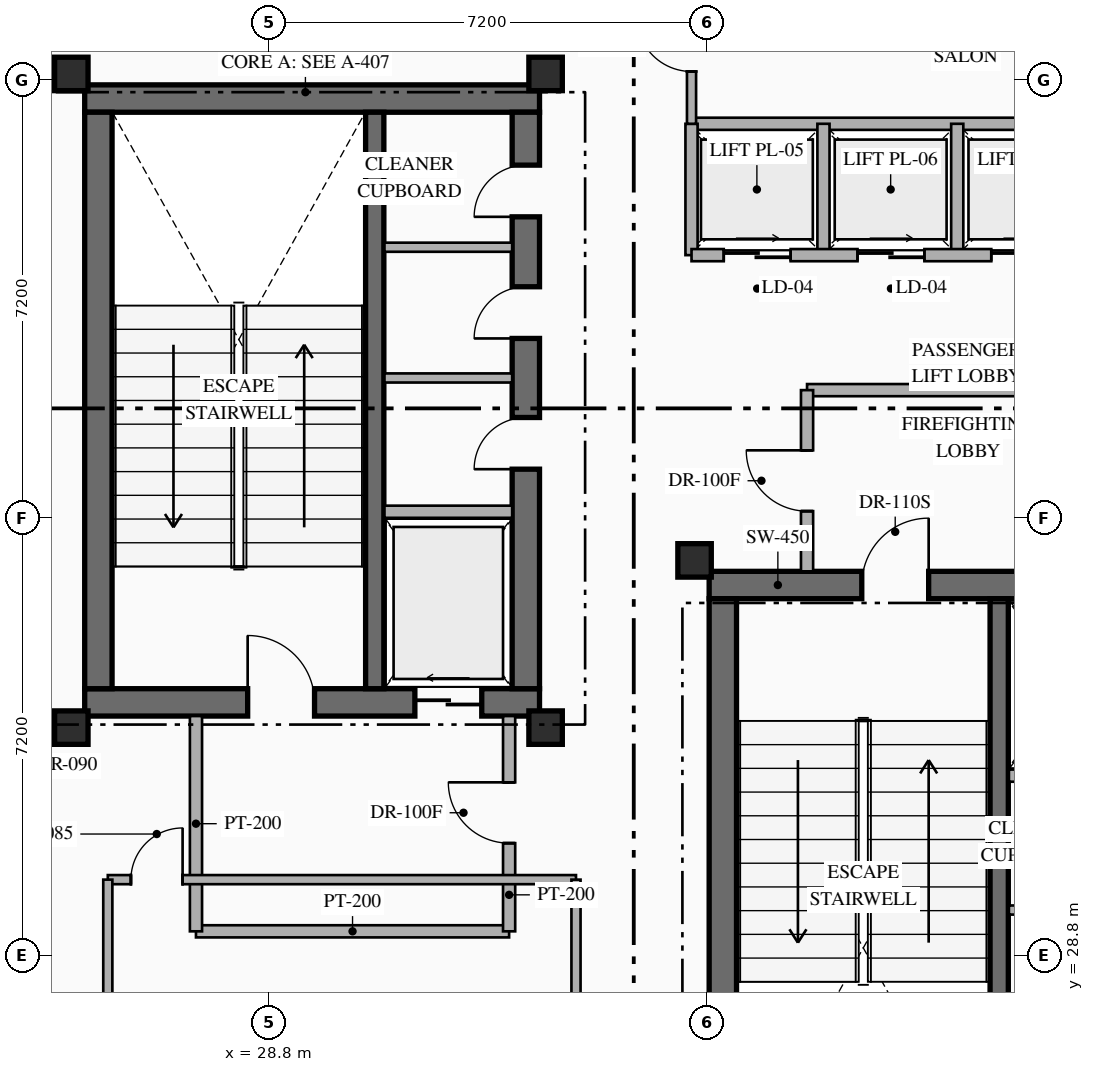
"""IFC4 building model, lengths in metres.
Left out: names, types, materials, properties, quantities, classifications, styles, units other than length and angle.
Written with IfcOpenShell. Run it as: python <this file> out.ifc"""

import sys

from ifc_helpers import new_model, si_unit, direction, frame, frame_2d, origin, origin_2d, place, context, subcontext, project, spatial, rectangle, hollow_rectangle, extrude, element, fill, save


model = new_model("IFC4")
c1 = context("Model", 3, precision=1e-05, world=origin(), true_north=direction((0.0, 1.0)))
c2 = subcontext(c1, "Body", "Model", "MODEL_VIEW")
j1 = project(units=[si_unit("LENGTHUNIT", "METRE"), si_unit("PLANEANGLEUNIT", "RADIAN")], contexts=[c1])
p1 = place(None, origin())
s1 = spatial("IfcSite", under=j1, at=p1, CompositionType="ELEMENT")
p2 = place(p1, origin())
s2 = spatial("IfcBuilding", under=s1, at=p2, CompositionType="ELEMENT")
p3 = place(p2, frame((0.0, 0.0, 285.95)))
s3 = spatial("IfcBuildingStorey", under=s2, at=p3, CompositionType="ELEMENT", Elevation=285.95)
p4 = place(p3, frame((25.77, 32.965, 0.0), z_axis=(0.0, 0.0, 1.0), x_axis=(1.0, 0.0, 0.0)))
e1 = element("IfcWall", 1, at=p4, inside=s3, PredefinedType="SHEAR", context=c2, shape_type="SweptSolid", body=[
    extrude(rectangle(XDim=7.48, YDim=0.45, at=frame_2d((3.74, 0.0))), origin(), (0.0, 0.0, 1.0), 4.0),
])
p5 = place(p4, frame((2.68, 0.0, 0.0)))
e2 = element("IfcOpeningElement", 2, at=p5, cuts=e1, PredefinedType="OPENING", context=c2, shape_type="SweptSolid", body=[
    extrude(rectangle(XDim=1.1, YDim=2.2, at=frame_2d((0.55, 1.1))), frame((0.0, 0.235, 0.0), z_axis=(0.0, -1.0, 0.0), x_axis=(1.0, 0.0, 0.0)), (0.0, 0.0, 1.0), 0.47),
])
p6 = place(p4, frame((5.43, 0.0, 0.0)))
e3 = element("IfcOpeningElement", 3, at=p6, cuts=e1, PredefinedType="OPENING", context=c2, shape_type="SweptSolid", body=[
    extrude(rectangle(XDim=1.1, YDim=2.15, at=frame_2d((0.55, 1.075))), frame((0.0, 0.235, 0.0), z_axis=(0.0, -1.0, 0.0), x_axis=(1.0, 0.0, 0.0)), (0.0, 0.0, 1.0), 0.47),
])
p7 = place(p3, frame((25.77, 42.895, 0.0), z_axis=(0.0, 0.0, 1.0), x_axis=(1.0, 0.0, 0.0)))
e4 = element("IfcWall", 4, at=p7, inside=s3, PredefinedType="SHEAR", context=c2, shape_type="SweptSolid", body=[
    extrude(rectangle(XDim=7.48, YDim=0.45, at=frame_2d((3.74, 0.0))), origin(), (0.0, 0.0, 1.0), 4.0),
])
p8 = place(p3, frame((25.995, 33.19, 0.0), z_axis=(0.0, 0.0, 1.0), x_axis=(0.0, 1.0, 0.0)))
e5 = element("IfcWall", 5, at=p8, inside=s3, PredefinedType="SHEAR", context=c2, shape_type="SweptSolid", body=[
    extrude(rectangle(XDim=9.48, YDim=0.45, at=frame_2d((4.74, 0.0))), origin(), (0.0, 0.0, 1.0), 4.0),
])
p9 = place(p3, frame((33.025, 33.19, 0.0), z_axis=(0.0, 0.0, 1.0), x_axis=(0.0, 1.0, 0.0)))
e6 = element("IfcWall", 6, at=p9, inside=s3, PredefinedType="SHEAR", context=c2, shape_type="SweptSolid", body=[
    extrude(rectangle(XDim=9.48, YDim=0.45, at=frame_2d((4.74, 0.0))), origin(), (0.0, 0.0, 1.0), 4.0),
])
p10 = place(p9, frame((3.61, 0.0, 0.0)))
e7 = element("IfcOpeningElement", 7, at=p10, cuts=e6, PredefinedType="OPENING", context=c2, shape_type="SweptSolid", body=[
    extrude(rectangle(XDim=0.85, YDim=2.08, at=frame_2d((0.425, 1.04))), frame((0.0, 0.235, 0.0), z_axis=(0.0, -1.0, 0.0), x_axis=(1.0, 0.0, 0.0)), (0.0, 0.0, 1.0), 0.47),
])
p11 = place(p9, frame((5.76, 0.0, 0.0)))
e8 = element("IfcOpeningElement", 8, at=p11, cuts=e6, PredefinedType="OPENING", context=c2, shape_type="SweptSolid", body=[
    extrude(rectangle(XDim=0.85, YDim=2.08, at=frame_2d((0.425, 1.04))), frame((0.0, 0.235, 0.0), z_axis=(0.0, -1.0, 0.0), x_axis=(1.0, 0.0, 0.0)), (0.0, 0.0, 1.0), 0.47),
])
p12 = place(p9, frame((7.76, 0.0, 0.0)))
e9 = element("IfcOpeningElement", 9, at=p12, cuts=e6, PredefinedType="OPENING", context=c2, shape_type="SweptSolid", body=[
    extrude(rectangle(XDim=0.85, YDim=2.08, at=frame_2d((0.425, 1.04))), frame((0.0, 0.235, 0.0), z_axis=(0.0, -1.0, 0.0), x_axis=(1.0, 0.0, 0.0)), (0.0, 0.0, 1.0), 0.47),
])
p13 = place(p3, frame((30.54, 33.19, 0.0), z_axis=(0.0, 0.0, 1.0), x_axis=(0.0, 1.0, 0.0)))
e10 = element("IfcWall", 10, at=p13, inside=s3, PredefinedType="SHEAR", context=c2, shape_type="SweptSolid", body=[
    extrude(rectangle(XDim=9.48, YDim=0.3, at=frame_2d((4.74, 0.0))), origin(), (0.0, 0.0, 1.0), 4.0),
])
p14 = place(p3, frame((36.04, 34.895, 0.0), z_axis=(0.0, 0.0, 1.0), x_axis=(1.0, 0.0, 0.0)))
e11 = element("IfcWall", 11, at=p14, inside=s3, PredefinedType="SHEAR", context=c2, shape_type="SweptSolid", body=[
    extrude(rectangle(XDim=7.46, YDim=0.45, at=frame_2d((3.73, 0.0))), origin(), (0.0, 0.0, 1.0), 4.0),
])
p15 = place(p14, frame((2.51, 0.0, 0.0)))
e12 = element("IfcOpeningElement", 12, at=p15, cuts=e11, PredefinedType="OPENING", context=c2, shape_type="SweptSolid", body=[
    extrude(rectangle(XDim=1.1, YDim=2.2, at=frame_2d((0.55, 1.1))), frame((0.0, 0.235, 0.0), z_axis=(0.0, -1.0, 0.0), x_axis=(1.0, 0.0, 0.0)), (0.0, 0.0, 1.0), 0.47),
])
p16 = place(p14, frame((5.41, 0.0, 0.0)))
e13 = element("IfcOpeningElement", 13, at=p16, cuts=e11, PredefinedType="OPENING", context=c2, shape_type="SweptSolid", body=[
    extrude(rectangle(XDim=1.12, YDim=2.15, at=frame_2d((0.56, 1.075))), frame((0.0, 0.235, 0.0), z_axis=(0.0, -1.0, 0.0), x_axis=(1.0, 0.0, 0.0)), (0.0, 0.0, 1.0), 0.47),
])
p17 = place(p3, frame((36.265, 25.19, 0.0), z_axis=(0.0, 0.0, 1.0), x_axis=(0.0, 1.0, 0.0)))
e14 = element("IfcWall", 14, at=p17, inside=s3, PredefinedType="SHEAR", context=c2, shape_type="SweptSolid", body=[
    extrude(rectangle(XDim=9.48, YDim=0.45, at=frame_2d((4.74, 0.0))), origin(), (0.0, 0.0, 1.0), 4.0),
])
p18 = place(p3, frame((40.81, 25.19, 0.0), z_axis=(0.0, 0.0, 1.0), x_axis=(0.0, 1.0, 0.0)))
e15 = element("IfcWall", 15, at=p18, inside=s3, PredefinedType="SHEAR", context=c2, shape_type="SweptSolid", body=[
    extrude(rectangle(XDim=9.48, YDim=0.3, at=frame_2d((4.74, 0.0))), origin(), (0.0, 0.0, 1.0), 4.0),
])
for number, where, z_axis, x_axis in (
    (16, (25.55, 32.55, 0.0), (0.0, 0.0, 1.0), (1.0, 0.0, 0.0)),
    (17, (33.35, 32.55, 0.0), (0.0, 0.0, 1.0), (1.0, 0.0, 0.0)),
    (18, (25.55, 43.3, 0.0), (0.0, 0.0, 1.0), (1.0, 0.0, 0.0)),
    (19, (33.35, 43.3, 0.0), (0.0, 0.0, 1.0), (1.0, 0.0, 0.0)),
    (20, (35.8, 35.3, 0.0), (0.0, 0.0, 1.0), (1.0, 0.0, 0.0)),
):
    element("IfcColumn", number, at=place(p3, frame(where, z_axis=z_axis, x_axis=x_axis)), inside=s3, PredefinedType="COLUMN", context=c2, shape_type="SweptSolid", body=[
        extrude(hollow_rectangle(XDim=0.55, YDim=0.55, WallThickness=0.022, at=origin_2d()), origin(), (0.0, 0.0, 1.0), 4.0),
    ])
p19 = place(p3, frame((30.7, 36.1, 0.0), z_axis=(0.0, 0.0, 1.0), x_axis=(1.0, 0.0, 0.0)))
e21 = element("IfcWall", 21, at=p19, inside=s3, PredefinedType="STANDARD", context=c2, shape_type="SweptSolid", body=[
    extrude(rectangle(XDim=2.1, YDim=0.2, at=frame_2d((1.05, 0.0))), origin(), (0.0, 0.0, 1.0), 3.7),
])
for number, where, z_axis, x_axis in (
    (22, (30.7, 38.3, 0.0), (0.0, 0.0, 1.0), (1.0, 0.0, 0.0)),
    (23, (30.7, 40.45, 0.0), (0.0, 0.0, 1.0), (1.0, 0.0, 0.0)),
):
    element("IfcWall", number, at=place(p3, frame(where, z_axis=z_axis, x_axis=x_axis)), inside=s3, PredefinedType="PARTITIONING", context=c2, shape_type="SweptSolid", body=[
        extrude(rectangle(XDim=2.1, YDim=0.15, at=frame_2d((1.05, 0.0))), origin(), (0.0, 0.0, 1.0), 3.7),
    ])
p20 = place(p3, frame((40.97, 31.76, 0.0), z_axis=(0.0, 0.0, 1.0), x_axis=(1.0, 0.0, 0.0)))
e24 = element("IfcWall", 24, at=p20, inside=s3, PredefinedType="STANDARD", context=c2, shape_type="SweptSolid", body=[
    extrude(rectangle(XDim=2.08, YDim=0.2, at=frame_2d((1.04, 0.0))), origin(), (0.0, 0.0, 1.0), 3.7),
])
p21 = place(p3, frame((40.97, 29.55, 0.0), z_axis=(0.0, 0.0, 1.0), x_axis=(1.0, 0.0, 0.0)))
e25 = element("IfcWall", 25, at=p21, inside=s3, PredefinedType="PARTITIONING", context=c2, shape_type="SweptSolid", body=[
    extrude(rectangle(XDim=2.08, YDim=0.15, at=frame_2d((1.04, 0.0))), origin(), (0.0, 0.0, 1.0), 3.7),
])
p22 = place(p3, frame((27.6, 29.2, 0.0), z_axis=(0.0, 0.0, 1.0), x_axis=(1.0, 0.0, 0.0)))
e26 = element("IfcWall", 26, at=p22, inside=s3, PredefinedType="STANDARD", context=c2, shape_type="SweptSolid", body=[
    extrude(rectangle(XDim=5.15, YDim=0.2, at=frame_2d((2.575, 0.0))), origin(), (0.0, 0.0, 1.0), 3.7),
])
p23 = place(p3, frame((27.6, 29.2, 0.0), z_axis=(0.0, 0.0, 1.0), x_axis=(0.0, 1.0, 0.0)))
e27 = element("IfcWall", 27, at=p23, inside=s3, PredefinedType="STANDARD", context=c2, shape_type="SweptSolid", body=[
    extrude(rectangle(XDim=3.54, YDim=0.2, at=frame_2d((1.77, 0.0))), origin(), (0.0, 0.0, 1.0), 3.7),
])
p24 = place(p3, frame((32.75, 29.2, 0.0), z_axis=(0.0, 0.0, 1.0), x_axis=(0.0, 1.0, 0.0)))
e28 = element("IfcWall", 28, at=p24, inside=s3, PredefinedType="STANDARD", context=c2, shape_type="SweptSolid", body=[
    extrude(rectangle(XDim=3.54, YDim=0.2, at=frame_2d((1.77, 0.0))), origin(), (0.0, 0.0, 1.0), 3.7),
])
p25 = place(p24, frame((1.45, 0.0, 0.0)))
e29 = element("IfcOpeningElement", 29, at=p25, cuts=e28, PredefinedType="OPENING", context=c2, shape_type="SweptSolid", body=[
    extrude(rectangle(XDim=1.0, YDim=2.2, at=frame_2d((0.5, 1.1))), frame((0.0, 0.11, 0.0), z_axis=(0.0, -1.0, 0.0), x_axis=(1.0, 0.0, 0.0)), (0.0, 0.0, 1.0), 0.22),
])
p26 = place(p3, frame((37.65, 38.1, 0.0), z_axis=(0.0, 0.0, 1.0), x_axis=(1.0, 0.0, 0.0)))
e30 = element("IfcWall", 30, at=p26, inside=s3, PredefinedType="STANDARD", context=c2, shape_type="SweptSolid", body=[
    extrude(rectangle(XDim=5.3, YDim=0.2, at=frame_2d((2.65, 0.0))), origin(), (0.0, 0.0, 1.0), 3.7),
])
p27 = place(p3, frame((37.65, 35.12, 0.0), z_axis=(0.0, 0.0, 1.0), x_axis=(0.0, 1.0, 0.0)))
e31 = element("IfcWall", 31, at=p27, inside=s3, PredefinedType="STANDARD", context=c2, shape_type="SweptSolid", body=[
    extrude(rectangle(XDim=2.98, YDim=0.2, at=frame_2d((1.49, 0.0))), origin(), (0.0, 0.0, 1.0), 3.7),
])
p28 = place(p27, frame((0.99, 0.0, 0.0)))
e32 = element("IfcOpeningElement", 32, at=p28, cuts=e31, PredefinedType="OPENING", context=c2, shape_type="SweptSolid", body=[
    extrude(rectangle(XDim=1.0, YDim=2.2, at=frame_2d((0.5, 1.1))), frame((0.0, 0.11, 0.0), z_axis=(0.0, -1.0, 0.0), x_axis=(1.0, 0.0, 0.0)), (0.0, 0.0, 1.0), 0.22),
])
p29 = place(p3, frame((35.75, 42.48, 0.0), z_axis=(0.0, 0.0, 1.0), x_axis=(1.0, 0.0, 0.0)))
e33 = element("IfcWall", 33, at=p29, inside=s3, PredefinedType="STANDARD", context=c2, shape_type="SweptSolid", body=[
    extrude(rectangle(XDim=9.11, YDim=0.2, at=frame_2d((4.555, 0.0))), origin(), (0.0, 0.0, 1.0), 3.7),
])
for number, where, z_axis, x_axis in (
    (34, (35.75, 40.32, 0.0), (0.0, 0.0, 1.0), (0.0, 1.0, 0.0)),
    (35, (37.92, 40.32, 0.0), (0.0, 0.0, 1.0), (0.0, 1.0, 0.0)),
    (36, (40.12, 40.32, 0.0), (0.0, 0.0, 1.0), (0.0, 1.0, 0.0)),
):
    element("IfcWall", number, at=place(p3, frame(where, z_axis=z_axis, x_axis=x_axis)), inside=s3, PredefinedType="STANDARD", context=c2, shape_type="SweptSolid", body=[
        extrude(rectangle(XDim=2.16, YDim=0.2, at=frame_2d((1.08, 0.0))), origin(), (0.0, 0.0, 1.0), 3.7),
    ])
p30 = place(p3, frame((35.75, 40.32, 0.0), z_axis=(0.0, 0.0, 1.0), x_axis=(1.0, 0.0, 0.0)))
e37 = element("IfcWall", 37, at=p30, inside=s3, PredefinedType="STANDARD", context=c2, shape_type="SweptSolid", body=[
    extrude(rectangle(XDim=9.11, YDim=0.2, at=frame_2d((4.555, 0.0))), origin(), (0.0, 0.0, 1.0), 3.7),
])
p31 = place(p30, frame((0.53, 0.0, 0.0)))
e38 = element("IfcOpeningElement", 38, at=p31, cuts=e37, PredefinedType="OPENING", context=c2, shape_type="SweptSolid", body=[
    extrude(rectangle(XDim=1.1, YDim=2.18, at=frame_2d((0.55, 1.09))), frame((0.0, 0.11, 0.0), z_axis=(0.0, -1.0, 0.0), x_axis=(1.0, 0.0, 0.0)), (0.0, 0.0, 1.0), 0.22),
])
p32 = place(p30, frame((2.73, 0.0, 0.0)))
e39 = element("IfcOpeningElement", 39, at=p32, cuts=e37, PredefinedType="OPENING", context=c2, shape_type="SweptSolid", body=[
    extrude(rectangle(XDim=1.1, YDim=2.18, at=frame_2d((0.55, 1.09))), frame((0.0, 0.11, 0.0), z_axis=(0.0, -1.0, 0.0), x_axis=(1.0, 0.0, 0.0)), (0.0, 0.0, 1.0), 0.22),
])
p33 = place(p30, frame((4.93, 0.0, 0.0)))
e40 = element("IfcOpeningElement", 40, at=p33, cuts=e37, PredefinedType="OPENING", context=c2, shape_type="SweptSolid", body=[
    extrude(rectangle(XDim=1.1, YDim=2.18, at=frame_2d((0.55, 1.09))), frame((0.0, 0.11, 0.0), z_axis=(0.0, -1.0, 0.0), x_axis=(1.0, 0.0, 0.0)), (0.0, 0.0, 1.0), 0.22),
])
p34 = place(p30, frame((7.13, 0.0, 0.0)))
e41 = element("IfcOpeningElement", 41, at=p34, cuts=e37, PredefinedType="OPENING", context=c2, shape_type="SweptSolid", body=[
    extrude(rectangle(XDim=1.1, YDim=2.18, at=frame_2d((0.55, 1.09))), frame((0.0, 0.11, 0.0), z_axis=(0.0, -1.0, 0.0), x_axis=(1.0, 0.0, 0.0)), (0.0, 0.0, 1.0), 0.22),
])
p35 = place(p3, frame((26.15, 30.05, 0.0), z_axis=(0.0, 0.0, 1.0), x_axis=(1.0, 0.0, 0.0)))
e42 = element("IfcWall", 42, at=p35, inside=s3, PredefinedType="PARTITIONING", context=c2, shape_type="SweptSolid", body=[
    extrude(rectangle(XDim=7.7, YDim=0.15, at=frame_2d((3.85, 0.0))), origin(), (0.0, 0.0, 1.0), 3.7),
])
p36 = place(p35, frame((0.38, 0.0, 0.0)))
e43 = element("IfcOpeningElement", 43, at=p36, cuts=e42, PredefinedType="OPENING", context=c2, shape_type="SweptSolid", body=[
    extrude(rectangle(XDim=0.85, YDim=2.08, at=frame_2d((0.425, 1.04))), frame((0.0, 0.085, 0.0), z_axis=(0.0, -1.0, 0.0), x_axis=(1.0, 0.0, 0.0)), (0.0, 0.0, 1.0), 0.17),
])
for number, where, z_axis, x_axis in (
    (44, (26.15, 23.4, 0.0), (0.0, 0.0, 1.0), (0.0, 1.0, 0.0)),
    (45, (33.85, 23.4, 0.0), (0.0, 0.0, 1.0), (0.0, 1.0, 0.0)),
):
    element("IfcWall", number, at=place(p3, frame(where, z_axis=z_axis, x_axis=x_axis)), inside=s3, PredefinedType="PARTITIONING", context=c2, shape_type="SweptSolid", body=[
        extrude(rectangle(XDim=6.65, YDim=0.15, at=frame_2d((3.325, 0.0))), origin(), (0.0, 0.0, 1.0), 3.7),
    ])
p37 = place(p3, frame((35.75, 42.48, 0.0), z_axis=(0.0, 0.0, 1.0), x_axis=(0.0, 1.0, 0.0)))
e46 = element("IfcWall", 46, at=p37, inside=s3, PredefinedType="PARTITIONING", context=c2, shape_type="SweptSolid", body=[
    extrude(rectangle(XDim=2.62, YDim=0.15, at=frame_2d((1.31, 0.0))), origin(), (0.0, 0.0, 1.0), 3.7),
])
p38 = place(p37, frame((0.86, 0.0, 0.0)))
e47 = element("IfcOpeningElement", 47, at=p38, cuts=e46, PredefinedType="OPENING", context=c2, shape_type="SweptSolid", body=[
    extrude(rectangle(XDim=0.9, YDim=2.15, at=frame_2d((0.45, 1.075))), frame((0.0, 0.085, 0.0), z_axis=(0.0, -1.0, 0.0), x_axis=(1.0, 0.0, 0.0)), (0.0, 0.0, 1.0), 0.17),
])
p39 = place(p5, origin())
e48 = element("IfcDoor", 48, at=p39, inside=s3, OperationType="SINGLE_SWING_LEFT", PredefinedType="DOOR", context=c2, shape_type="SweptSolid", body=[
    extrude(rectangle(XDim=1.1, YDim=2.2, at=frame_2d((0.55, 1.1))), frame((0.0, 0.025, 0.0), z_axis=(0.0, -1.0, 0.0), x_axis=(1.0, 0.0, 0.0)), (0.0, 0.0, 1.0), 0.05),
])
fill(e2, e48)
p40 = place(p6, origin())
e49 = element("IfcDoor", 49, at=p40, inside=s3, OperationType="SLIDING_TO_LEFT", PredefinedType="USERDEFINED", context=c2, shape_type="SweptSolid", body=[
    extrude(rectangle(XDim=1.1, YDim=2.15, at=frame_2d((0.55, 1.075))), frame((0.0, 0.025, 0.0), z_axis=(0.0, -1.0, 0.0), x_axis=(1.0, 0.0, 0.0)), (0.0, 0.0, 1.0), 0.05),
])
fill(e3, e49)
p41 = place(p15, origin())
e50 = element("IfcDoor", 50, at=p41, inside=s3, OperationType="SINGLE_SWING_RIGHT", PredefinedType="DOOR", context=c2, shape_type="SweptSolid", body=[
    extrude(rectangle(XDim=1.1, YDim=2.2, at=frame_2d((0.55, 1.1))), frame((0.0, 0.025, 0.0), z_axis=(0.0, -1.0, 0.0), x_axis=(1.0, 0.0, 0.0)), (0.0, 0.0, 1.0), 0.05),
])
fill(e12, e50)
p42 = place(p10, origin())
e51 = element("IfcDoor", 51, at=p42, inside=s3, OperationType="SINGLE_SWING_LEFT", PredefinedType="DOOR", context=c2, shape_type="SweptSolid", body=[
    extrude(rectangle(XDim=0.85, YDim=2.08, at=frame_2d((0.425, 1.04))), frame((0.0, 0.025, 0.0), z_axis=(0.0, -1.0, 0.0), x_axis=(1.0, 0.0, 0.0)), (0.0, 0.0, 1.0), 0.05),
])
fill(e7, e51)
p43 = place(p11, origin())
e52 = element("IfcDoor", 52, at=p43, inside=s3, OperationType="SINGLE_SWING_LEFT", PredefinedType="DOOR", context=c2, shape_type="SweptSolid", body=[
    extrude(rectangle(XDim=0.85, YDim=2.08, at=frame_2d((0.425, 1.04))), frame((0.0, 0.025, 0.0), z_axis=(0.0, -1.0, 0.0), x_axis=(1.0, 0.0, 0.0)), (0.0, 0.0, 1.0), 0.05),
])
fill(e8, e52)
p44 = place(p12, origin())
e53 = element("IfcDoor", 53, at=p44, inside=s3, OperationType="SINGLE_SWING_LEFT", PredefinedType="DOOR", context=c2, shape_type="SweptSolid", body=[
    extrude(rectangle(XDim=0.85, YDim=2.08, at=frame_2d((0.425, 1.04))), frame((0.0, 0.025, 0.0), z_axis=(0.0, -1.0, 0.0), x_axis=(1.0, 0.0, 0.0)), (0.0, 0.0, 1.0), 0.05),
])
fill(e9, e53)
p45 = place(p25, origin())
e54 = element("IfcDoor", 54, at=p45, inside=s3, OperationType="SINGLE_SWING_RIGHT", PredefinedType="DOOR", context=c2, shape_type="SweptSolid", body=[
    extrude(rectangle(XDim=1.0, YDim=2.2, at=frame_2d((0.5, 1.1))), frame((0.0, 0.025, 0.0), z_axis=(0.0, -1.0, 0.0), x_axis=(1.0, 0.0, 0.0)), (0.0, 0.0, 1.0), 0.05),
])
fill(e29, e54)
p46 = place(p28, origin())
e55 = element("IfcDoor", 55, at=p46, inside=s3, OperationType="SINGLE_SWING_RIGHT", PredefinedType="DOOR", context=c2, shape_type="SweptSolid", body=[
    extrude(rectangle(XDim=1.0, YDim=2.2, at=frame_2d((0.5, 1.1))), frame((0.0, 0.025, 0.0), z_axis=(0.0, -1.0, 0.0), x_axis=(1.0, 0.0, 0.0)), (0.0, 0.0, 1.0), 0.05),
])
fill(e32, e55)
p47 = place(p31, origin())
e56 = element("IfcDoor", 56, at=p47, inside=s3, OperationType="SLIDING_TO_RIGHT", PredefinedType="USERDEFINED", context=c2, shape_type="SweptSolid", body=[
    extrude(rectangle(XDim=1.1, YDim=2.18, at=frame_2d((0.55, 1.09))), frame((0.0, 0.025, 0.0), z_axis=(0.0, -1.0, 0.0), x_axis=(1.0, 0.0, 0.0)), (0.0, 0.0, 1.0), 0.05),
])
fill(e38, e56)
p48 = place(p32, origin())
e57 = element("IfcDoor", 57, at=p48, inside=s3, OperationType="SLIDING_TO_RIGHT", PredefinedType="USERDEFINED", context=c2, shape_type="SweptSolid", body=[
    extrude(rectangle(XDim=1.1, YDim=2.18, at=frame_2d((0.55, 1.09))), frame((0.0, 0.025, 0.0), z_axis=(0.0, -1.0, 0.0), x_axis=(1.0, 0.0, 0.0)), (0.0, 0.0, 1.0), 0.05),
])
fill(e39, e57)
p49 = place(p33, origin())
e58 = element("IfcDoor", 58, at=p49, inside=s3, OperationType="SLIDING_TO_RIGHT", PredefinedType="USERDEFINED", context=c2, shape_type="SweptSolid", body=[
    extrude(rectangle(XDim=1.1, YDim=2.18, at=frame_2d((0.55, 1.09))), frame((0.0, 0.025, 0.0), z_axis=(0.0, -1.0, 0.0), x_axis=(1.0, 0.0, 0.0)), (0.0, 0.0, 1.0), 0.05),
])
fill(e40, e58)
p50 = place(p36, origin())
e59 = element("IfcDoor", 59, at=p50, inside=s3, OperationType="SINGLE_SWING_RIGHT", PredefinedType="DOOR", context=c2, shape_type="SweptSolid", body=[
    extrude(rectangle(XDim=0.85, YDim=2.08, at=frame_2d((0.425, 1.04))), frame((0.0, 0.025, 0.0), z_axis=(0.0, -1.0, 0.0), x_axis=(1.0, 0.0, 0.0)), (0.0, 0.0, 1.0), 0.05),
])
fill(e43, e59)
p51 = place(p38, origin())
e60 = element("IfcDoor", 60, at=p51, inside=s3, OperationType="SINGLE_SWING_RIGHT", PredefinedType="DOOR", context=c2, shape_type="SweptSolid", body=[
    extrude(rectangle(XDim=0.9, YDim=2.15, at=frame_2d((0.45, 1.075))), frame((0.0, 0.025, 0.0), z_axis=(0.0, -1.0, 0.0), x_axis=(1.0, 0.0, 0.0)), (0.0, 0.0, 1.0), 0.05),
])
fill(e47, e60)
save(model, sys.argv[1])
